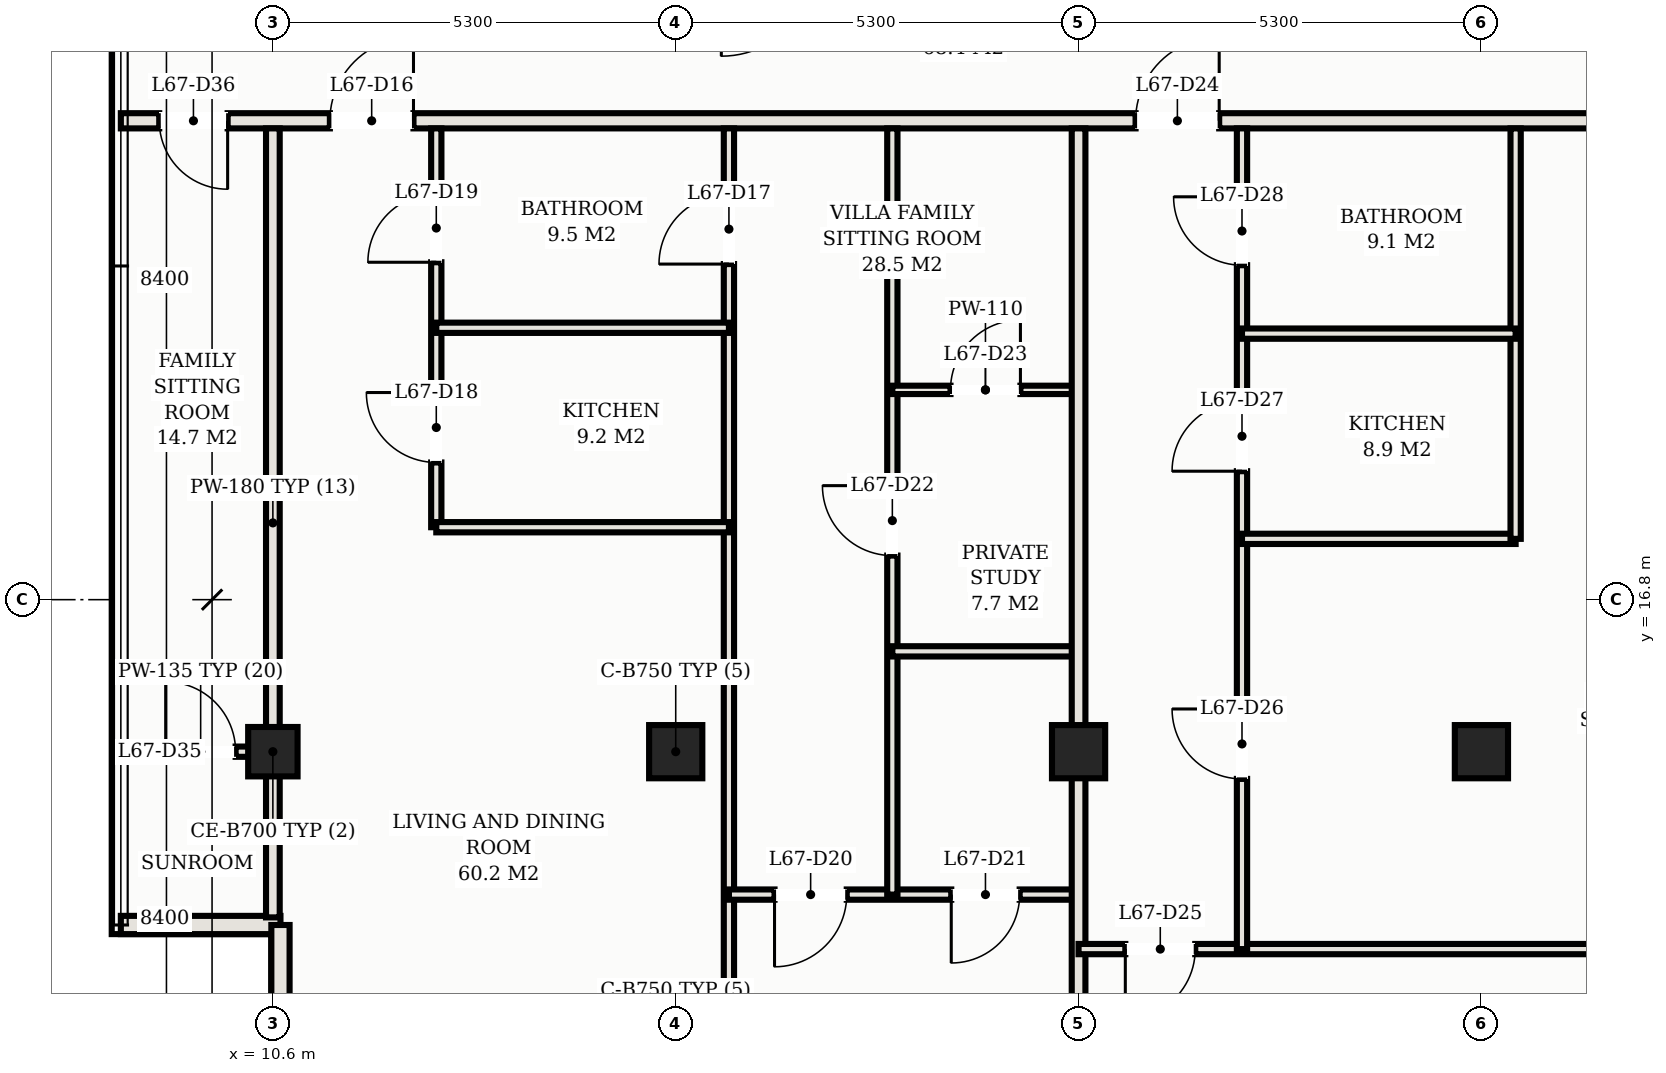
"""IFC4 building model, lengths in metres.
Left out: names, types, materials, properties, quantities, classifications, styles, units other than length and angle.
Written with IfcOpenShell. Run it as: python <this file> out.ifc"""

import sys

from ifc_helpers import new_model, si_unit, direction, frame, frame_2d, origin, origin_2d, place, context, subcontext, project, spatial, rectangle, hollow_rectangle, extrude, element, fill, save


model = new_model("IFC4")
c1 = context("Model", 3, precision=1e-05, world=origin(), true_north=direction((0.0, 1.0)))
c2 = subcontext(c1, "Body", "Model", "MODEL_VIEW")
j1 = project(units=[si_unit("LENGTHUNIT", "METRE"), si_unit("PLANEANGLEUNIT", "RADIAN")], contexts=[c1])
p1 = place(None, origin())
s1 = spatial("IfcSite", under=j1, at=p1, CompositionType="ELEMENT")
p2 = place(p1, origin())
s2 = spatial("IfcBuilding", under=s1, at=p2, CompositionType="ELEMENT")
p3 = place(p2, frame((0.0, 0.0, 242.9)))
s3 = spatial("IfcBuildingStorey", under=s2, at=p3, CompositionType="ELEMENT", Elevation=242.9)
for number, where, z_axis, x_axis in (
    (1, (15.9, 14.8, 0.0), (0.0, 0.0, 1.0), (1.0, 0.0, 0.0)),
    (2, (21.2, 14.8, 0.0), (0.0, 0.0, 1.0), (1.0, 0.0, 0.0)),
    (3, (26.5, 14.8, 0.0), (0.0, 0.0, 1.0), (1.0, 0.0, 0.0)),
):
    element("IfcColumn", number, at=place(p3, frame(where, z_axis=z_axis, x_axis=x_axis)), inside=s3, PredefinedType="COLUMN", context=c2, shape_type="SweptSolid", body=[
        extrude(hollow_rectangle(XDim=0.7, YDim=0.7, WallThickness=0.025, at=origin_2d()), origin(), (0.0, 0.0, 1.0), 3.3),
    ])
p4 = place(p3, frame((10.6, 14.8, 0.0), z_axis=(0.0, 0.0, 1.0), x_axis=(1.0, 0.0, 0.0)))
e4 = element("IfcColumn", 4, at=p4, inside=s3, PredefinedType="COLUMN", context=c2, shape_type="SweptSolid", body=[
    extrude(hollow_rectangle(XDim=0.65, YDim=0.65, WallThickness=0.022, at=origin_2d()), origin(), (0.0, 0.0, 1.0), 3.3),
])
p5 = place(p3, frame((8.6, 12.52, 0.0), z_axis=(0.0, 0.0, 1.0), x_axis=(1.0, 0.0, 0.0)))
e5 = element("IfcWall", 5, at=p5, inside=s3, PredefinedType="SOLIDWALL", context=c2, shape_type="SweptSolid", body=[
    extrude(rectangle(XDim=2.1, YDim=0.24, at=frame_2d((1.05, 0.0))), origin(), (0.0, 0.0, 1.0), 3.11),
])
p6 = place(p3, frame((10.7, 12.52, 0.0), z_axis=(0.0, 0.0, 1.0), x_axis=(0.0, -1.0, 0.0)))
e6 = element("IfcWall", 6, at=p6, inside=s3, PredefinedType="SOLIDWALL", context=c2, shape_type="SweptSolid", body=[
    extrude(rectangle(XDim=2.1, YDim=0.24, at=frame_2d((1.05, 0.0))), origin(), (0.0, 0.0, 1.0), 3.11),
])
p7 = place(p3, frame((8.6, 23.1, 0.0), z_axis=(0.0, 0.0, 1.0), x_axis=(1.0, 0.0, 0.0)))
e7 = element("IfcWall", 7, at=p7, inside=s3, PredefinedType="PARTITIONING", context=c2, shape_type="SweptSolid", body=[
    extrude(rectangle(XDim=35.8, YDim=0.2, at=frame_2d((17.9, 0.0))), origin(), (0.0, 0.0, 1.0), 2.45),
])
p8 = place(p7, frame((2.75, 0.0, 0.0)))
e8 = element("IfcOpeningElement", 8, at=p8, cuts=e7, PredefinedType="OPENING", context=c2, shape_type="SweptSolid", body=[
    extrude(rectangle(XDim=1.1, YDim=2.25, at=frame_2d((0.55, 1.125))), frame((0.0, 0.11, 0.0), z_axis=(0.0, -1.0, 0.0), x_axis=(1.0, 0.0, 0.0)), (0.0, 0.0, 1.0), 0.22),
])
p9 = place(p7, frame((13.35, 0.0, 0.0)))
e9 = element("IfcOpeningElement", 9, at=p9, cuts=e7, PredefinedType="OPENING", context=c2, shape_type="SweptSolid", body=[
    extrude(rectangle(XDim=1.1, YDim=2.25, at=frame_2d((0.55, 1.125))), frame((0.0, 0.11, 0.0), z_axis=(0.0, -1.0, 0.0), x_axis=(1.0, 0.0, 0.0)), (0.0, 0.0, 1.0), 0.22),
])
p10 = place(p7, frame((23.95, 0.0, 0.0)))
e10 = element("IfcOpeningElement", 10, at=p10, cuts=e7, PredefinedType="OPENING", context=c2, shape_type="SweptSolid", body=[
    extrude(rectangle(XDim=1.1, YDim=2.25, at=frame_2d((0.55, 1.125))), frame((0.0, 0.11, 0.0), z_axis=(0.0, -1.0, 0.0), x_axis=(1.0, 0.0, 0.0)), (0.0, 0.0, 1.0), 0.22),
])
p11 = place(p7, frame((29.25, 0.0, 0.0)))
e11 = element("IfcOpeningElement", 11, at=p11, cuts=e7, PredefinedType="OPENING", context=c2, shape_type="SweptSolid", body=[
    extrude(rectangle(XDim=1.1, YDim=2.25, at=frame_2d((0.55, 1.125))), frame((0.0, 0.11, 0.0), z_axis=(0.0, -1.0, 0.0), x_axis=(1.0, 0.0, 0.0)), (0.0, 0.0, 1.0), 0.22),
])
p12 = place(p7, frame((0.505, 0.0, 0.0)))
e12 = element("IfcOpeningElement", 12, at=p12, cuts=e7, PredefinedType="OPENING", context=c2, shape_type="SweptSolid", body=[
    extrude(rectangle(XDim=0.9, YDim=2.15, at=frame_2d((0.45, 1.075))), frame((0.0, 0.11, 0.0), z_axis=(0.0, -1.0, 0.0), x_axis=(1.0, 0.0, 0.0)), (0.0, 0.0, 1.0), 0.22),
])
p13 = place(p7, frame((34.395, 0.0, 0.0)))
e13 = element("IfcOpeningElement", 13, at=p13, cuts=e7, PredefinedType="OPENING", context=c2, shape_type="SweptSolid", body=[
    extrude(rectangle(XDim=0.9, YDim=2.15, at=frame_2d((0.45, 1.075))), frame((0.0, 0.11, 0.0), z_axis=(0.0, -1.0, 0.0), x_axis=(1.0, 0.0, 0.0)), (0.0, 0.0, 1.0), 0.22),
])
p14 = place(p3, frame((10.6, 12.62, 0.0), z_axis=(0.0, 0.0, 1.0), x_axis=(0.0, 1.0, 0.0)))
e14 = element("IfcWall", 14, at=p14, inside=s3, PredefinedType="PARTITIONING", context=c2, shape_type="SweptSolid", body=[
    extrude(rectangle(XDim=10.38, YDim=0.18, at=frame_2d((5.19, 0.0))), origin(), (0.0, 0.0, 1.0), 2.45),
])
p15 = place(p3, frame((16.6, 8.42, 0.0), z_axis=(0.0, 0.0, 1.0), x_axis=(0.0, 1.0, 0.0)))
e15 = element("IfcWall", 15, at=p15, inside=s3, PredefinedType="PARTITIONING", context=c2, shape_type="SweptSolid", body=[
    extrude(rectangle(XDim=14.58, YDim=0.135, at=frame_2d((7.29, 0.0))), origin(), (0.0, 0.0, 1.0), 2.45),
])
p16 = place(p15, frame((12.795, 0.0, 0.0)))
e16 = element("IfcOpeningElement", 16, at=p16, cuts=e15, PredefinedType="OPENING", context=c2, shape_type="SweptSolid", body=[
    extrude(rectangle(XDim=0.92, YDim=2.15, at=frame_2d((0.46, 1.075))), frame((0.0, 0.078, 0.0), z_axis=(0.0, -1.0, 0.0), x_axis=(1.0, 0.0, 0.0)), (0.0, 0.0, 1.0), 0.155),
])
p17 = place(p3, frame((12.75, 17.753, 0.0), z_axis=(0.0, 0.0, 1.0), x_axis=(0.0, 1.0, 0.0)))
e17 = element("IfcWall", 17, at=p17, inside=s3, PredefinedType="PARTITIONING", context=c2, shape_type="SweptSolid", body=[
    extrude(rectangle(XDim=5.247, YDim=0.135, at=frame_2d((2.624, 0.0))), origin(), (0.0, 0.0, 1.0), 2.45),
])
p18 = place(p17, frame((0.852, 0.0, 0.0)))
e18 = element("IfcOpeningElement", 18, at=p18, cuts=e17, PredefinedType="OPENING", context=c2, shape_type="SweptSolid", body=[
    extrude(rectangle(XDim=0.92, YDim=2.15, at=frame_2d((0.46, 1.075))), frame((0.0, 0.078, 0.0), z_axis=(0.0, -1.0, 0.0), x_axis=(1.0, 0.0, 0.0)), (0.0, 0.0, 1.0), 0.155),
])
p19 = place(p17, frame((3.486, 0.0, 0.0)))
e19 = element("IfcOpeningElement", 19, at=p19, cuts=e17, PredefinedType="OPENING", context=c2, shape_type="SweptSolid", body=[
    extrude(rectangle(XDim=0.9, YDim=2.15, at=frame_2d((0.45, 1.075))), frame((0.0, 0.078, 0.0), z_axis=(0.0, -1.0, 0.0), x_axis=(1.0, 0.0, 0.0)), (0.0, 0.0, 1.0), 0.155),
])
for number, where, z_axis, x_axis in (
    (20, (12.75, 17.753, 0.0), (0.0, 0.0, 1.0), (1.0, 0.0, 0.0)),
    (21, (12.75, 20.377, 0.0), (0.0, 0.0, 1.0), (1.0, 0.0, 0.0)),
):
    element("IfcWall", number, at=place(p3, frame(where, z_axis=z_axis, x_axis=x_axis)), inside=s3, PredefinedType="PARTITIONING", context=c2, shape_type="SweptSolid", body=[
        extrude(rectangle(XDim=3.85, YDim=0.135, at=frame_2d((1.925, 0.0))), origin(), (0.0, 0.0, 1.0), 2.45),
    ])
p20 = place(p3, frame((16.6, 12.92, 0.0), z_axis=(0.0, 0.0, 1.0), x_axis=(1.0, 0.0, 0.0)))
e22 = element("IfcWall", 22, at=p20, inside=s3, PredefinedType="PARTITIONING", context=c2, shape_type="SweptSolid", body=[
    extrude(rectangle(XDim=4.6, YDim=0.135, at=frame_2d((2.3, 0.0))), origin(), (0.0, 0.0, 1.0), 2.45),
])
p21 = place(p20, frame((0.6, 0.0, 0.0)))
e23 = element("IfcOpeningElement", 23, at=p21, cuts=e22, PredefinedType="OPENING", context=c2, shape_type="SweptSolid", body=[
    extrude(rectangle(XDim=0.95, YDim=2.15, at=frame_2d((0.475, 1.075))), frame((0.0, 0.078, 0.0), z_axis=(0.0, -1.0, 0.0), x_axis=(1.0, 0.0, 0.0)), (0.0, 0.0, 1.0), 0.155),
])
p22 = place(p20, frame((2.925, 0.0, 0.0)))
e24 = element("IfcOpeningElement", 24, at=p22, cuts=e22, PredefinedType="OPENING", context=c2, shape_type="SweptSolid", body=[
    extrude(rectangle(XDim=0.9, YDim=2.15, at=frame_2d((0.45, 1.075))), frame((0.0, 0.078, 0.0), z_axis=(0.0, -1.0, 0.0), x_axis=(1.0, 0.0, 0.0)), (0.0, 0.0, 1.0), 0.155),
])
p23 = place(p3, frame((18.75, 12.92, 0.0), z_axis=(0.0, 0.0, 1.0), x_axis=(0.0, 1.0, 0.0)))
e25 = element("IfcWall", 25, at=p23, inside=s3, PredefinedType="PARTITIONING", context=c2, shape_type="SweptSolid", body=[
    extrude(rectangle(XDim=10.08, YDim=0.135, at=frame_2d((5.04, 0.0))), origin(), (0.0, 0.0, 1.0), 2.45),
])
p24 = place(p23, frame((4.46, 0.0, 0.0)))
e26 = element("IfcOpeningElement", 26, at=p24, cuts=e25, PredefinedType="OPENING", context=c2, shape_type="SweptSolid", body=[
    extrude(rectangle(XDim=0.92, YDim=2.15, at=frame_2d((0.46, 1.075))), frame((0.0, 0.078, 0.0), z_axis=(0.0, -1.0, 0.0), x_axis=(1.0, 0.0, 0.0)), (0.0, 0.0, 1.0), 0.155),
])
p25 = place(p3, frame((18.75, 16.12, 0.0), z_axis=(0.0, 0.0, 1.0), x_axis=(1.0, 0.0, 0.0)))
e27 = element("IfcWall", 27, at=p25, inside=s3, PredefinedType="PARTITIONING", context=c2, shape_type="SweptSolid", body=[
    extrude(rectangle(XDim=2.45, YDim=0.135, at=frame_2d((1.225, 0.0))), origin(), (0.0, 0.0, 1.0), 2.45),
])
p26 = place(p3, frame((18.75, 19.56, 0.0), z_axis=(0.0, 0.0, 1.0), x_axis=(1.0, 0.0, 0.0)))
e28 = element("IfcWall", 28, at=p26, inside=s3, PredefinedType="MOVABLE", context=c2, shape_type="SweptSolid", body=[
    extrude(rectangle(XDim=2.45, YDim=0.11, at=frame_2d((1.225, 0.0))), origin(), (0.0, 0.0, 1.0), 2.45),
])
p27 = place(p26, frame((0.765, 0.0, 0.0)))
e29 = element("IfcOpeningElement", 29, at=p27, cuts=e28, PredefinedType="OPENING", context=c2, shape_type="SweptSolid", body=[
    extrude(rectangle(XDim=0.92, YDim=2.15, at=frame_2d((0.46, 1.075))), frame((0.0, 0.065, 0.0), z_axis=(0.0, -1.0, 0.0), x_axis=(1.0, 0.0, 0.0)), (0.0, 0.0, 1.0), 0.13),
])
p28 = place(p3, frame((21.2, 8.098, 0.0), z_axis=(0.0, 0.0, 1.0), x_axis=(0.0, 1.0, 0.0)))
e30 = element("IfcWall", 30, at=p28, inside=s3, PredefinedType="PARTITIONING", context=c2, shape_type="SweptSolid", body=[
    extrude(rectangle(XDim=14.902, YDim=0.18, at=frame_2d((7.451, 0.0))), origin(), (0.0, 0.0, 1.0), 2.45),
])
p29 = place(p3, frame((21.2, 12.203, 0.0), z_axis=(0.0, 0.0, 1.0), x_axis=(1.0, 0.0, 0.0)))
e31 = element("IfcWall", 31, at=p29, inside=s3, PredefinedType="PARTITIONING", context=c2, shape_type="SweptSolid", body=[
    extrude(rectangle(XDim=10.6, YDim=0.135, at=frame_2d((5.3, 0.0))), origin(), (0.0, 0.0, 1.0), 2.45),
])
p30 = place(p29, frame((0.615, 0.0, 0.0)))
e32 = element("IfcOpeningElement", 32, at=p30, cuts=e31, PredefinedType="OPENING", context=c2, shape_type="SweptSolid", body=[
    extrude(rectangle(XDim=0.92, YDim=2.15, at=frame_2d((0.46, 1.075))), frame((0.0, 0.078, 0.0), z_axis=(0.0, -1.0, 0.0), x_axis=(1.0, 0.0, 0.0)), (0.0, 0.0, 1.0), 0.155),
])
p31 = place(p3, frame((23.35, 12.203, 0.0), z_axis=(0.0, 0.0, 1.0), x_axis=(0.0, 1.0, 0.0)))
e33 = element("IfcWall", 33, at=p31, inside=s3, PredefinedType="PARTITIONING", context=c2, shape_type="SweptSolid", body=[
    extrude(rectangle(XDim=10.797, YDim=0.135, at=frame_2d((5.398, 0.0))), origin(), (0.0, 0.0, 1.0), 2.45),
])
p32 = place(p31, frame((2.239, 0.0, 0.0)))
e34 = element("IfcOpeningElement", 34, at=p32, cuts=e33, PredefinedType="OPENING", context=c2, shape_type="SweptSolid", body=[
    extrude(rectangle(XDim=0.92, YDim=2.15, at=frame_2d((0.46, 1.075))), frame((0.0, 0.078, 0.0), z_axis=(0.0, -1.0, 0.0), x_axis=(1.0, 0.0, 0.0)), (0.0, 0.0, 1.0), 0.155),
])
p33 = place(p31, frame((6.287, 0.0, 0.0)))
e35 = element("IfcOpeningElement", 35, at=p33, cuts=e33, PredefinedType="OPENING", context=c2, shape_type="SweptSolid", body=[
    extrude(rectangle(XDim=0.92, YDim=2.15, at=frame_2d((0.46, 1.075))), frame((0.0, 0.078, 0.0), z_axis=(0.0, -1.0, 0.0), x_axis=(1.0, 0.0, 0.0)), (0.0, 0.0, 1.0), 0.155),
])
p34 = place(p31, frame((8.997, 0.0, 0.0)))
e36 = element("IfcOpeningElement", 36, at=p34, cuts=e33, PredefinedType="OPENING", context=c2, shape_type="SweptSolid", body=[
    extrude(rectangle(XDim=0.9, YDim=2.15, at=frame_2d((0.45, 1.075))), frame((0.0, 0.078, 0.0), z_axis=(0.0, -1.0, 0.0), x_axis=(1.0, 0.0, 0.0)), (0.0, 0.0, 1.0), 0.155),
])
p35 = place(p3, frame((23.35, 17.6, 0.0), z_axis=(0.0, 0.0, 1.0), x_axis=(1.0, 0.0, 0.0)))
e37 = element("IfcWall", 37, at=p35, inside=s3, PredefinedType="PARTITIONING", context=c2, shape_type="SweptSolid", body=[
    extrude(rectangle(XDim=3.6, YDim=0.135, at=frame_2d((1.8, 0.0))), origin(), (0.0, 0.0, 1.0), 2.45),
])
p36 = place(p3, frame((26.95, 17.6, 0.0), z_axis=(0.0, 0.0, 1.0), x_axis=(0.0, 1.0, 0.0)))
e38 = element("IfcWall", 38, at=p36, inside=s3, PredefinedType="PARTITIONING", context=c2, shape_type="SweptSolid", body=[
    extrude(rectangle(XDim=5.4, YDim=0.135, at=frame_2d((2.7, 0.0))), origin(), (0.0, 0.0, 1.0), 2.45),
])
p37 = place(p3, frame((23.35, 20.3, 0.0), z_axis=(0.0, 0.0, 1.0), x_axis=(1.0, 0.0, 0.0)))
e39 = element("IfcWall", 39, at=p37, inside=s3, PredefinedType="PARTITIONING", context=c2, shape_type="SweptSolid", body=[
    extrude(rectangle(XDim=3.6, YDim=0.135, at=frame_2d((1.8, 0.0))), origin(), (0.0, 0.0, 1.0), 2.45),
])
p38 = place(p3, frame((8.7, 14.8, 0.0), z_axis=(0.0, 0.0, 1.0), x_axis=(1.0, 0.0, 0.0)))
e40 = element("IfcWall", 40, at=p38, inside=s3, PredefinedType="PARTITIONING", context=c2, shape_type="SweptSolid", body=[
    extrude(rectangle(XDim=1.9, YDim=0.135, at=frame_2d((0.95, 0.0))), origin(), (0.0, 0.0, 1.0), 2.45),
])
p39 = place(p38, frame((0.49, 0.0, 0.0)))
e41 = element("IfcOpeningElement", 41, at=p39, cuts=e40, PredefinedType="OPENING", context=c2, shape_type="SweptSolid", body=[
    extrude(rectangle(XDim=0.92, YDim=2.15, at=frame_2d((0.46, 1.075))), frame((0.0, 0.078, 0.0), z_axis=(0.0, -1.0, 0.0), x_axis=(1.0, 0.0, 0.0)), (0.0, 0.0, 1.0), 0.155),
])
p40 = place(p8, origin())
e42 = element("IfcDoor", 42, at=p40, inside=s3, OperationType="SINGLE_SWING_RIGHT", PredefinedType="DOOR", context=c2, shape_type="SweptSolid", body=[
    extrude(rectangle(XDim=1.1, YDim=2.25, at=frame_2d((0.55, 1.125))), frame((0.0, 0.025, 0.0), z_axis=(0.0, -1.0, 0.0), x_axis=(1.0, 0.0, 0.0)), (0.0, 0.0, 1.0), 0.05),
])
fill(e8, e42)
p41 = place(p16, origin())
e43 = element("IfcDoor", 43, at=p41, inside=s3, OperationType="SINGLE_SWING_LEFT", PredefinedType="DOOR", context=c2, shape_type="SweptSolid", body=[
    extrude(rectangle(XDim=0.92, YDim=2.15, at=frame_2d((0.46, 1.075))), frame((0.0, 0.025, 0.0), z_axis=(0.0, -1.0, 0.0), x_axis=(1.0, 0.0, 0.0)), (0.0, 0.0, 1.0), 0.05),
])
fill(e16, e43)
p42 = place(p18, origin())
e44 = element("IfcDoor", 44, at=p42, inside=s3, OperationType="SINGLE_SWING_RIGHT", PredefinedType="DOOR", context=c2, shape_type="SweptSolid", body=[
    extrude(rectangle(XDim=0.92, YDim=2.15, at=frame_2d((0.46, 1.075))), frame((0.0, 0.025, 0.0), z_axis=(0.0, -1.0, 0.0), x_axis=(1.0, 0.0, 0.0)), (0.0, 0.0, 1.0), 0.05),
])
fill(e18, e44)
p43 = place(p19, origin())
e45 = element("IfcDoor", 45, at=p43, inside=s3, OperationType="SINGLE_SWING_LEFT", PredefinedType="DOOR", context=c2, shape_type="SweptSolid", body=[
    extrude(rectangle(XDim=0.9, YDim=2.15, at=frame_2d((0.45, 1.075))), frame((0.0, 0.025, 0.0), z_axis=(0.0, -1.0, 0.0), x_axis=(1.0, 0.0, 0.0)), (0.0, 0.0, 1.0), 0.05),
])
fill(e19, e45)
p44 = place(p21, frame((0.95, 0.0, 0.0), z_axis=(0.0, 0.0, 1.0), x_axis=(-1.0, 0.0, 0.0)))
e46 = element("IfcDoor", 46, at=p44, inside=s3, OperationType="SINGLE_SWING_RIGHT", PredefinedType="DOOR", context=c2, shape_type="SweptSolid", body=[
    extrude(rectangle(XDim=0.95, YDim=2.15, at=frame_2d((0.475, 1.075))), frame((0.0, 0.025, 0.0), z_axis=(0.0, -1.0, 0.0), x_axis=(1.0, 0.0, 0.0)), (0.0, 0.0, 1.0), 0.05),
])
fill(e23, e46)
p45 = place(p22, frame((0.9, 0.0, 0.0), z_axis=(0.0, 0.0, 1.0), x_axis=(-1.0, 0.0, 0.0)))
e47 = element("IfcDoor", 47, at=p45, inside=s3, OperationType="SINGLE_SWING_RIGHT", PredefinedType="DOOR", context=c2, shape_type="SweptSolid", body=[
    extrude(rectangle(XDim=0.9, YDim=2.15, at=frame_2d((0.45, 1.075))), frame((0.0, 0.025, 0.0), z_axis=(0.0, -1.0, 0.0), x_axis=(1.0, 0.0, 0.0)), (0.0, 0.0, 1.0), 0.05),
])
fill(e24, e47)
p46 = place(p24, origin())
e48 = element("IfcDoor", 48, at=p46, inside=s3, OperationType="SINGLE_SWING_RIGHT", PredefinedType="DOOR", context=c2, shape_type="SweptSolid", body=[
    extrude(rectangle(XDim=0.92, YDim=2.15, at=frame_2d((0.46, 1.075))), frame((0.0, 0.025, 0.0), z_axis=(0.0, -1.0, 0.0), x_axis=(1.0, 0.0, 0.0)), (0.0, 0.0, 1.0), 0.05),
])
fill(e26, e48)
p47 = place(p27, origin())
e49 = element("IfcDoor", 49, at=p47, inside=s3, OperationType="SINGLE_SWING_RIGHT", PredefinedType="DOOR", context=c2, shape_type="SweptSolid", body=[
    extrude(rectangle(XDim=0.92, YDim=2.15, at=frame_2d((0.46, 1.075))), frame((0.0, 0.025, 0.0), z_axis=(0.0, -1.0, 0.0), x_axis=(1.0, 0.0, 0.0)), (0.0, 0.0, 1.0), 0.05),
])
fill(e29, e49)
p48 = place(p9, origin())
e50 = element("IfcDoor", 50, at=p48, inside=s3, OperationType="SINGLE_SWING_RIGHT", PredefinedType="DOOR", context=c2, shape_type="SweptSolid", body=[
    extrude(rectangle(XDim=1.1, YDim=2.25, at=frame_2d((0.55, 1.125))), frame((0.0, 0.025, 0.0), z_axis=(0.0, -1.0, 0.0), x_axis=(1.0, 0.0, 0.0)), (0.0, 0.0, 1.0), 0.05),
])
fill(e9, e50)
p49 = place(p30, frame((0.92, 0.0, 0.0), z_axis=(0.0, 0.0, 1.0), x_axis=(-1.0, 0.0, 0.0)))
e51 = element("IfcDoor", 51, at=p49, inside=s3, OperationType="SINGLE_SWING_RIGHT", PredefinedType="DOOR", context=c2, shape_type="SweptSolid", body=[
    extrude(rectangle(XDim=0.92, YDim=2.15, at=frame_2d((0.46, 1.075))), frame((0.0, 0.025, 0.0), z_axis=(0.0, -1.0, 0.0), x_axis=(1.0, 0.0, 0.0)), (0.0, 0.0, 1.0), 0.05),
])
fill(e32, e51)
p50 = place(p32, origin())
e52 = element("IfcDoor", 52, at=p50, inside=s3, OperationType="SINGLE_SWING_RIGHT", PredefinedType="DOOR", context=c2, shape_type="SweptSolid", body=[
    extrude(rectangle(XDim=0.92, YDim=2.15, at=frame_2d((0.46, 1.075))), frame((0.0, 0.025, 0.0), z_axis=(0.0, -1.0, 0.0), x_axis=(1.0, 0.0, 0.0)), (0.0, 0.0, 1.0), 0.05),
])
fill(e34, e52)
p51 = place(p33, origin())
e53 = element("IfcDoor", 53, at=p51, inside=s3, OperationType="SINGLE_SWING_LEFT", PredefinedType="DOOR", context=c2, shape_type="SweptSolid", body=[
    extrude(rectangle(XDim=0.92, YDim=2.15, at=frame_2d((0.46, 1.075))), frame((0.0, 0.025, 0.0), z_axis=(0.0, -1.0, 0.0), x_axis=(1.0, 0.0, 0.0)), (0.0, 0.0, 1.0), 0.05),
])
fill(e35, e53)
p52 = place(p34, origin())
e54 = element("IfcDoor", 54, at=p52, inside=s3, OperationType="SINGLE_SWING_RIGHT", PredefinedType="DOOR", context=c2, shape_type="SweptSolid", body=[
    extrude(rectangle(XDim=0.9, YDim=2.15, at=frame_2d((0.45, 1.075))), frame((0.0, 0.025, 0.0), z_axis=(0.0, -1.0, 0.0), x_axis=(1.0, 0.0, 0.0)), (0.0, 0.0, 1.0), 0.05),
])
fill(e36, e54)
p53 = place(p39, origin())
e55 = element("IfcDoor", 55, at=p53, inside=s3, OperationType="SINGLE_SWING_LEFT", PredefinedType="DOOR", context=c2, shape_type="SweptSolid", body=[
    extrude(rectangle(XDim=0.92, YDim=2.15, at=frame_2d((0.46, 1.075))), frame((0.0, 0.025, 0.0), z_axis=(0.0, -1.0, 0.0), x_axis=(1.0, 0.0, 0.0)), (0.0, 0.0, 1.0), 0.05),
])
fill(e41, e55)
p54 = place(p12, frame((0.9, 0.0, 0.0), z_axis=(0.0, 0.0, 1.0), x_axis=(-1.0, 0.0, 0.0)))
e56 = element("IfcDoor", 56, at=p54, inside=s3, OperationType="SINGLE_SWING_LEFT", PredefinedType="DOOR", context=c2, shape_type="SweptSolid", body=[
    extrude(rectangle(XDim=0.9, YDim=2.15, at=frame_2d((0.45, 1.075))), frame((0.0, 0.025, 0.0), z_axis=(0.0, -1.0, 0.0), x_axis=(1.0, 0.0, 0.0)), (0.0, 0.0, 1.0), 0.05),
])
fill(e12, e56)
save(model, sys.argv[1])
